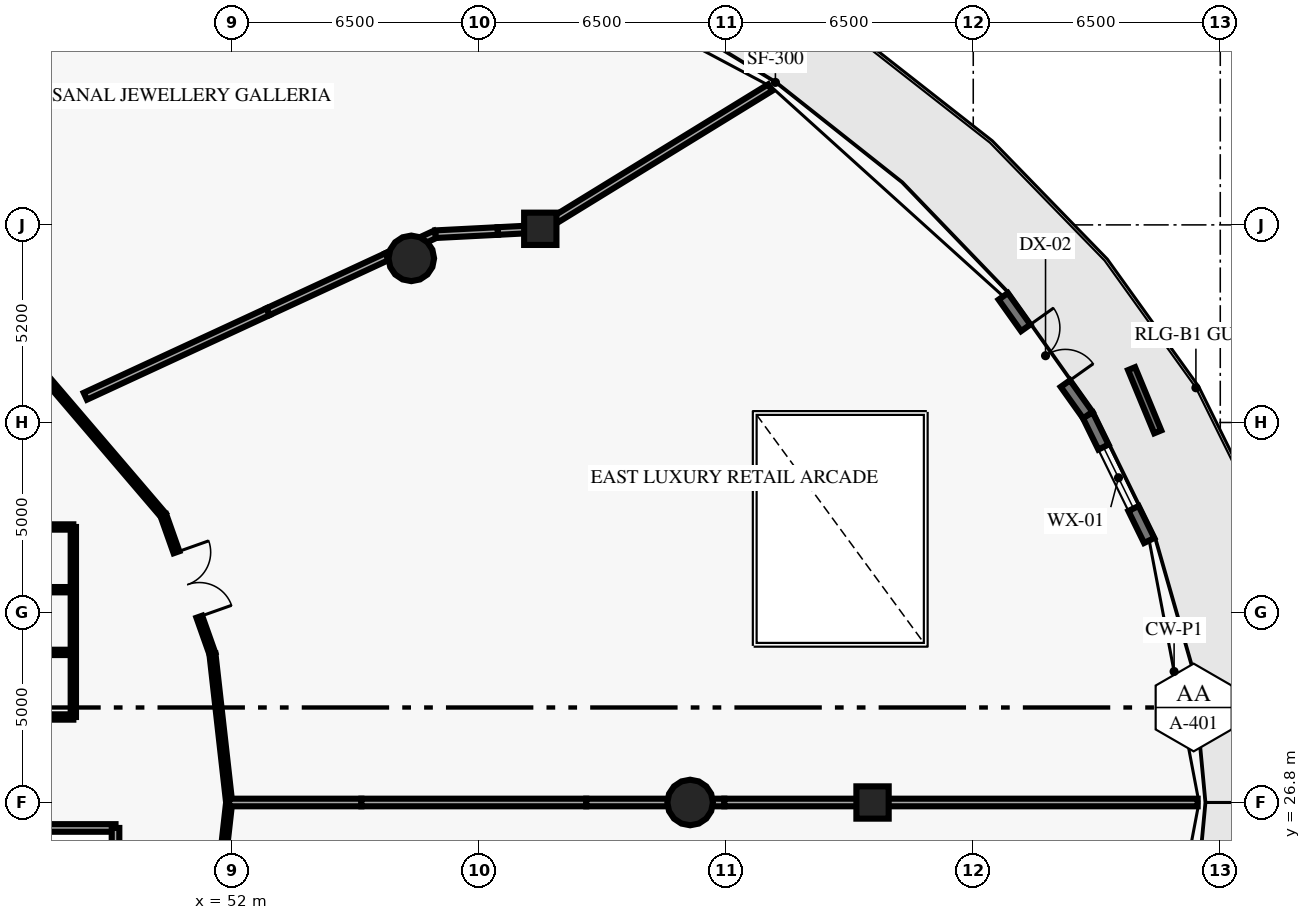
"""IFC4 building model, lengths in metres.
Left out: names, types, materials, properties, quantities, classifications, styles, units other than length and angle.
Written with IfcOpenShell. Run it as: python <this file> out.ifc"""

import sys

from ifc_helpers import new_model, si_unit, direction, frame, frame_2d, origin, origin_2d, place, context, subcontext, project, spatial, rectangle, circle, extrude, element, fill, save


model = new_model("IFC4")
c1 = context("Model", 3, precision=1e-05, world=origin(), true_north=direction((0.0, 1.0)))
c2 = subcontext(c1, "Body", "Model", "MODEL_VIEW")
j1 = project(units=[si_unit("LENGTHUNIT", "METRE"), si_unit("PLANEANGLEUNIT", "RADIAN")], contexts=[c1])
p1 = place(None, origin())
s1 = spatial("IfcSite", under=j1, at=p1, CompositionType="ELEMENT")
p2 = place(p1, origin())
s2 = spatial("IfcBuilding", under=s1, at=p2, CompositionType="ELEMENT")
p3 = place(p2, frame((0.0, 0.0, 6.0)))
s3 = spatial("IfcBuildingStorey", under=s2, at=p3, CompositionType="ELEMENT", Elevation=6.0)
for number, where, z_axis, x_axis in (
    (1, (64.05, 26.8, 0.0), (0.0, 0.0, 1.0), (1.0, 0.0, 0.0)),
    (2, (56.713, 41.119, 0.0), (0.0, 0.0, 1.0), (1.0, 0.0, 0.0)),
):
    element("IfcColumn", number, at=place(p3, frame(where, z_axis=z_axis, x_axis=x_axis)), inside=s3, PredefinedType="COLUMN", context=c2, shape_type="SweptSolid", body=[
        extrude(circle(Radius=0.6, at=origin_2d()), origin(), (0.0, 0.0, 1.0), 4.7),
    ])
for number, where, z_axis, x_axis in (
    (3, (68.85, 26.8, 0.0), (0.0, 0.0, 1.0), (1.0, 0.0, 0.0)),
    (4, (60.107, 41.897, 0.0), (0.0, 0.0, 1.0), (1.0, 0.0, 0.0)),
):
    element("IfcColumn", number, at=place(p3, frame(where, z_axis=z_axis, x_axis=x_axis)), inside=s3, PredefinedType="COLUMN", context=c2, shape_type="SweptSolid", body=[
        extrude(rectangle(XDim=0.85, YDim=0.85, at=origin_2d()), origin(), (0.0, 0.0, 1.0), 4.7),
    ])
p4 = place(p3, frame((74.514, 36.995, 0.0), z_axis=(0.0, 0.0, 1.0), x_axis=(0.4397832387, -0.89810394886, 0.0)))
e5 = element("IfcWall", 5, at=p4, inside=s3, PredefinedType="STANDARD", context=c2, shape_type="SweptSolid", body=[
    extrude(rectangle(XDim=3.675, YDim=0.3, at=frame_2d((1.837, 0.0))), origin(), (0.0, 0.0, 1.0), 4.7),
])
p5 = place(p4, frame((0.937, 0.0, 0.9)))
e6 = element("IfcOpeningElement", 6, at=p5, cuts=e5, PredefinedType="OPENING", context=c2, shape_type="SweptSolid", body=[
    extrude(rectangle(XDim=1.8, YDim=2.4, at=frame_2d((0.9, 1.2))), frame((0.0, 0.16, 0.0), z_axis=(0.0, -1.0, 0.0), x_axis=(1.0, 0.0, 0.0)), (0.0, 0.0, 1.0), 0.32),
])
p6 = place(p3, frame((72.29, 40.12, 0.0), z_axis=(0.0, 0.0, 1.0), x_axis=(0.579810280566, -0.814751519514, 0.0)))
e7 = element("IfcWall", 7, at=p6, inside=s3, PredefinedType="STANDARD", context=c2, shape_type="SweptSolid", body=[
    extrude(rectangle(XDim=3.835, YDim=0.3, at=frame_2d((1.918, 0.0))), origin(), (0.0, 0.0, 1.0), 4.7),
])
p7 = place(p6, frame((1.018, 0.0, 0.0)))
e8 = element("IfcOpeningElement", 8, at=p7, cuts=e7, PredefinedType="OPENING", context=c2, shape_type="SweptSolid", body=[
    extrude(rectangle(XDim=1.8, YDim=2.25, at=frame_2d((0.9, 1.125))), frame((0.0, 0.16, 0.0), z_axis=(0.0, -1.0, 0.0), x_axis=(1.0, 0.0, 0.0)), (0.0, 0.0, 1.0), 0.32),
])
p8 = place(p3, frame((75.666, 38.217, 0.0), z_axis=(0.0, 0.0, 1.0), x_axis=(0.382727098568, -0.923861444169, 0.0)))
e9 = element("IfcWall", 9, at=p8, inside=s3, PredefinedType="ELEMENTEDWALL", context=c2, shape_type="SweptSolid", body=[
    extrude(rectangle(XDim=1.8, YDim=0.2, at=frame_2d((0.9, 0.0))), origin(), (0.0, 0.0, 1.0), 0.65),
])
p9 = place(p3, frame((46.62, 26.13, 0.0), z_axis=(0.0, 0.0, 1.0), x_axis=(1.0, 0.0, 0.0)))
e10 = element("IfcWall", 10, at=p9, inside=s3, PredefinedType="SOLIDWALL", context=c2, shape_type="SweptSolid", body=[
    extrude(rectangle(XDim=2.31, YDim=0.2, at=frame_2d((1.155, 0.0))), origin(), (0.0, 0.0, 1.0), 4.7),
])
p10 = place(p3, frame((48.93, 23.72, 0.0), z_axis=(0.0, 0.0, 1.0), x_axis=(0.0, 1.0, 0.0)))
e11 = element("IfcWall", 11, at=p10, inside=s3, PredefinedType="SOLIDWALL", context=c2, shape_type="SweptSolid", body=[
    extrude(rectangle(XDim=2.41, YDim=0.2, at=frame_2d((1.205, 0.0))), origin(), (0.0, 0.0, 1.0), 4.7),
])
p11 = place(p3, frame((46.77, 29.05, 0.0), z_axis=(0.0, 0.0, 1.0), x_axis=(1.0, 0.0, 0.0)))
e12 = element("IfcWall", 12, at=p11, inside=s3, PredefinedType="PARTITIONING", context=c2, shape_type="SweptSolid", body=[
    extrude(rectangle(XDim=1.05, YDim=0.14, at=frame_2d((0.525, 0.0))), origin(), (0.0, 0.0, 1.0), 4.7),
])
for number, where, z_axis, x_axis in (
    (13, (46.18, 30.75, 0.0), (0.0, 0.0, 1.0), (1.0, 0.0, 0.0)),
    (14, (46.18, 32.4, 0.0), (0.0, 0.0, 1.0), (1.0, 0.0, 0.0)),
    (15, (46.18, 34.05, 0.0), (0.0, 0.0, 1.0), (1.0, 0.0, 0.0)),
):
    element("IfcWall", number, at=place(p3, frame(where, z_axis=z_axis, x_axis=x_axis)), inside=s3, PredefinedType="PARTITIONING", context=c2, shape_type="SweptSolid", body=[
        extrude(rectangle(XDim=1.64, YDim=0.14, at=frame_2d((0.82, 0.0))), origin(), (0.0, 0.0, 1.0), 4.7),
    ])
p12 = place(p3, frame((47.82, 29.05, 0.0), z_axis=(0.0, 0.0, 1.0), x_axis=(0.0, 1.0, 0.0)))
e16 = element("IfcWall", 16, at=p12, inside=s3, PredefinedType="PARTITIONING", context=c2, shape_type="SweptSolid", body=[
    extrude(rectangle(XDim=5.0, YDim=0.14, at=frame_2d((2.5, 0.0))), origin(), (0.0, 0.0, 1.0), 4.7),
])
p13 = place(p3, frame((51.92, 26.8, 0.0), z_axis=(0.0, 0.0, 1.0), x_axis=(-0.111731247657, 0.993738460711, 0.0)))
e17 = element("IfcWall", 17, at=p13, inside=s3, PredefinedType="PARTITIONING", context=c2, shape_type="SweptSolid", body=[
    extrude(rectangle(XDim=3.938, YDim=0.16, at=frame_2d((1.969, 0.0))), origin(), (0.0, 0.0, 1.0), 4.7),
])
p14 = place(p3, frame((50.189, 34.36, 0.0), z_axis=(0.0, 0.0, 1.0), x_axis=(0.333684770033, -0.942684716248, 0.0)))
e18 = element("IfcWall", 18, at=p14, inside=s3, PredefinedType="PARTITIONING", context=c2, shape_type="SweptSolid", body=[
    extrude(rectangle(XDim=3.869, YDim=0.16, at=frame_2d((1.935, 0.0))), origin(), (0.0, 0.0, 1.0), 4.7),
])
p15 = place(p14, frame((1.034, 0.0, 0.0)))
e19 = element("IfcOpeningElement", 19, at=p15, cuts=e18, PredefinedType="OPENING", context=c2, shape_type="SweptSolid", body=[
    extrude(rectangle(XDim=1.8, YDim=2.3, at=frame_2d((0.9, 1.15))), frame((0.0, 0.09, 0.0), z_axis=(0.0, -1.0, 0.0), x_axis=(1.0, 0.0, 0.0)), (0.0, 0.0, 1.0), 0.18),
])
p16 = place(p3, frame((50.189, 34.36, 0.0), z_axis=(0.0, 0.0, 1.0), x_axis=(-0.649652680018, 0.760231145998, 0.0)))
e20 = element("IfcWall", 20, at=p16, inside=s3, PredefinedType="PARTITIONING", context=c2, shape_type="SweptSolid", body=[
    extrude(rectangle(XDim=7.279, YDim=0.16, at=frame_2d((3.64, 0.0))), origin(), (0.0, 0.0, 1.0), 4.7),
])
p17 = place(p3, frame((51.92, 26.8, 0.0), z_axis=(0.0, 0.0, 1.0), x_axis=(-0.111724363671, -0.99373923469, 0.0)))
e21 = element("IfcWall", 21, at=p17, inside=s3, PredefinedType="PARTITIONING", context=c2, shape_type="SweptSolid", body=[
    extrude(rectangle(XDim=3.938, YDim=0.16, at=frame_2d((1.969, 0.0))), origin(), (0.0, 0.0, 1.0), 4.7),
])
p18 = place(p17, frame((1.069, 0.0, 0.0)))
e22 = element("IfcOpeningElement", 22, at=p18, cuts=e21, PredefinedType="OPENING", context=c2, shape_type="SweptSolid", body=[
    extrude(rectangle(XDim=1.8, YDim=2.3, at=frame_2d((0.9, 1.15))), frame((0.0, 0.09, 0.0), z_axis=(0.0, -1.0, 0.0), x_axis=(1.0, 0.0, 0.0)), (0.0, 0.0, 1.0), 0.18),
])
p19 = place(p3, frame((51.92, 26.8, 0.0), z_axis=(0.0, 0.0, 1.0), x_axis=(1.0, 0.0, 0.0)))
e23 = element("IfcWall", 23, at=p19, inside=s3, PredefinedType="PARTITIONING", context=c2, shape_type="SweptSolid", body=[
    extrude(rectangle(XDim=3.48, YDim=0.2, at=frame_2d((1.74, 0.0))), origin(), (0.0, 0.0, 1.0), 4.7),
])
p20 = place(p3, frame((55.4, 26.8, 0.0), z_axis=(0.0, 0.0, 1.0), x_axis=(1.0, 0.0, 0.0)))
e24 = element("IfcWall", 24, at=p20, inside=s3, PredefinedType="PARTITIONING", context=c2, shape_type="SweptSolid", body=[
    extrude(rectangle(XDim=5.917, YDim=0.2, at=frame_2d((2.958, 0.0))), origin(), (0.0, 0.0, 1.0), 4.7),
])
p21 = place(p3, frame((61.317, 26.8, 0.0), z_axis=(0.0, 0.0, 1.0), x_axis=(1.0, 0.0, 0.0)))
e25 = element("IfcWall", 25, at=p21, inside=s3, PredefinedType="PARTITIONING", context=c2, shape_type="SweptSolid", body=[
    extrude(rectangle(XDim=3.633, YDim=0.2, at=frame_2d((1.816, 0.0))), origin(), (0.0, 0.0, 1.0), 3.66),
])
p22 = place(p3, frame((64.95, 26.8, 0.0), z_axis=(0.0, 0.0, 1.0), x_axis=(1.0, 0.0, 0.0)))
e26 = element("IfcWall", 26, at=p22, inside=s3, PredefinedType="PARTITIONING", context=c2, shape_type="SweptSolid", body=[
    extrude(rectangle(XDim=3.9, YDim=0.2, at=frame_2d((1.95, 0.0))), origin(), (0.0, 0.0, 1.0), 4.24),
])
p23 = place(p3, frame((68.85, 26.8, 0.0), z_axis=(0.0, 0.0, 1.0), x_axis=(1.0, 0.0, 0.0)))
e27 = element("IfcWall", 27, at=p23, inside=s3, PredefinedType="PARTITIONING", context=c2, shape_type="SweptSolid", body=[
    extrude(rectangle(XDim=8.555, YDim=0.2, at=frame_2d((4.277, 0.0))), origin(), (0.0, 0.0, 1.0), 4.7),
])
p24 = place(p3, frame((48.136, 37.491, 0.0), z_axis=(0.0, 0.0, 1.0), x_axis=(0.907524785669, 0.419998527851, 0.0)))
e28 = element("IfcWall", 28, at=p24, inside=s3, PredefinedType="PARTITIONING", context=c2, shape_type="SweptSolid", body=[
    extrude(rectangle(XDim=5.3, YDim=0.2, at=frame_2d((2.65, 0.0))), origin(), (0.0, 0.0, 1.0), 4.7),
])
p25 = place(p3, frame((52.946, 39.717, 0.0), z_axis=(0.0, 0.0, 1.0), x_axis=(0.90747190463, 0.420112773321, 0.0)))
e29 = element("IfcWall", 29, at=p25, inside=s3, PredefinedType="PARTITIONING", context=c2, shape_type="SweptSolid", body=[
    extrude(rectangle(XDim=3.449, YDim=0.2, at=frame_2d((1.725, 0.0))), origin(), (0.0, 0.0, 1.0), 3.92),
])
p26 = place(p3, frame((56.076, 41.166, 0.0), z_axis=(0.0, 0.0, 1.0), x_axis=(0.907622896373, 0.419786467124, 0.0)))
e30 = element("IfcWall", 30, at=p26, inside=s3, PredefinedType="PARTITIONING", context=c2, shape_type="SweptSolid", body=[
    extrude(rectangle(XDim=1.403, YDim=0.2, at=frame_2d((0.701, 0.0))), origin(), (0.0, 0.0, 1.0), 4.7),
])
p27 = place(p3, frame((57.349, 41.755, 0.0), z_axis=(0.0, 0.0, 1.0), x_axis=(0.998685128887, 0.051264152576, 0.0)))
e31 = element("IfcWall", 31, at=p27, inside=s3, PredefinedType="PARTITIONING", context=c2, shape_type="SweptSolid", body=[
    extrude(rectangle(XDim=1.643, YDim=0.2, at=frame_2d((0.822, 0.0))), origin(), (0.0, 0.0, 1.0), 4.7),
])
p28 = place(p3, frame((58.99, 41.839, 0.0), z_axis=(0.0, 0.0, 1.0), x_axis=(0.998660904733, 0.051733909163, 0.0)))
e32 = element("IfcWall", 32, at=p28, inside=s3, PredefinedType="PARTITIONING", context=c2, shape_type="SweptSolid", body=[
    extrude(rectangle(XDim=1.118, YDim=0.2, at=frame_2d((0.559, 0.0))), origin(), (0.0, 0.0, 1.0), 4.24),
])
p29 = place(p3, frame((60.107, 41.897, 0.0), z_axis=(0.0, 0.0, 1.0), x_axis=(0.85206305886, 0.523439149974, 0.0)))
e33 = element("IfcWall", 33, at=p29, inside=s3, PredefinedType="PARTITIONING", context=c2, shape_type="SweptSolid", body=[
    extrude(rectangle(XDim=7.099, YDim=0.2, at=frame_2d((3.55, 0.0))), origin(), (0.0, 0.0, 1.0), 4.7),
])
p30 = place(p5, origin())
e34 = element("IfcWindow", 34, at=p30, inside=s3, PartitioningType="DOUBLE_PANEL_VERTICAL", PredefinedType="WINDOW", context=c2, shape_type="SweptSolid", body=[
    extrude(rectangle(XDim=1.8, YDim=2.4, at=frame_2d((0.9, 1.2))), frame((0.0, 0.03, 0.0), z_axis=(0.0, -1.0, 0.0), x_axis=(1.0, 0.0, 0.0)), (0.0, 0.0, 1.0), 0.06),
])
fill(e6, e34)
p31 = place(p7, origin())
e35 = element("IfcDoor", 35, at=p31, inside=s3, OperationType="DOUBLE_DOOR_SINGLE_SWING", PredefinedType="DOOR", context=c2, shape_type="SweptSolid", body=[
    extrude(rectangle(XDim=1.8, YDim=2.25, at=frame_2d((0.9, 1.125))), frame((0.0, 0.025, 0.0), z_axis=(0.0, -1.0, 0.0), x_axis=(1.0, 0.0, 0.0)), (0.0, 0.0, 1.0), 0.05),
])
fill(e8, e35)
p32 = place(p15, origin())
e36 = element("IfcDoor", 36, at=p32, inside=s3, OperationType="DOUBLE_DOOR_SINGLE_SWING", PredefinedType="DOOR", context=c2, shape_type="SweptSolid", body=[
    extrude(rectangle(XDim=1.8, YDim=2.3, at=frame_2d((0.9, 1.15))), frame((0.0, 0.025, 0.0), z_axis=(0.0, -1.0, 0.0), x_axis=(1.0, 0.0, 0.0)), (0.0, 0.0, 1.0), 0.05),
])
fill(e19, e36)
save(model, sys.argv[1])
